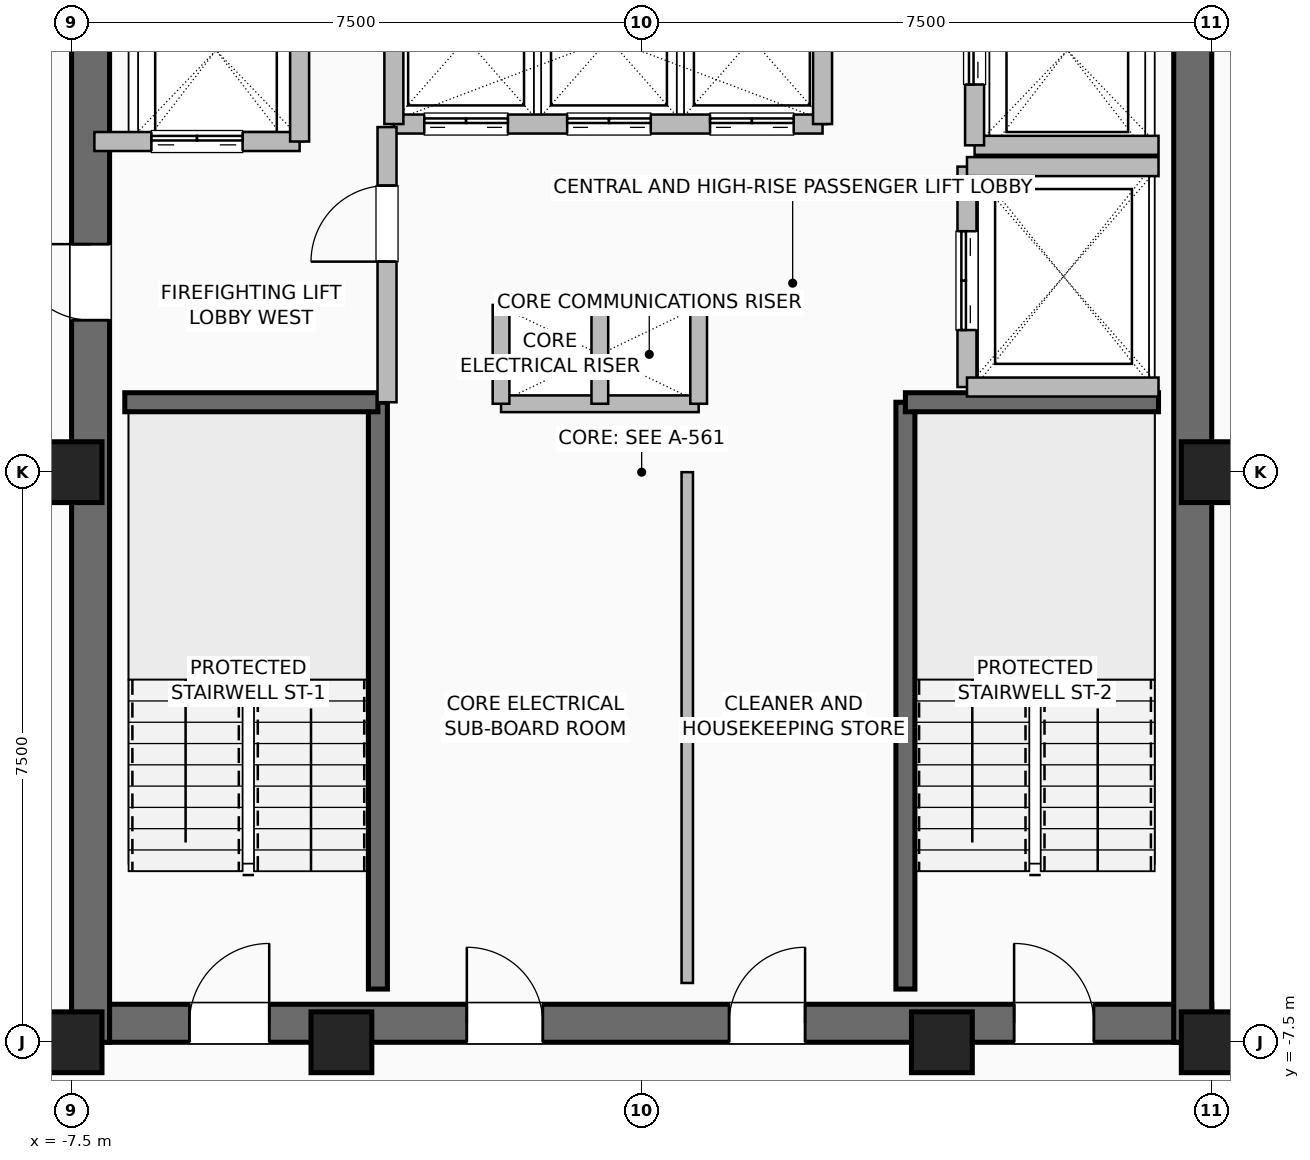
"""IFC4 building model, lengths in metres.
Left out: names, types, materials, properties, quantities, classifications, styles, units other than length and angle.
Written with IfcOpenShell. Run it as: python <this file> out.ifc"""

import sys

from ifc_helpers import new_model, si_unit, direction, frame, frame_2d, origin, origin_2d, place, context, subcontext, project, spatial, rectangle, hollow_rectangle, extrude, element, fill, save


model = new_model("IFC4")
c1 = context("Model", 3, precision=1e-05, world=origin(), true_north=direction((0.0, 1.0)))
c2 = subcontext(c1, "Body", "Model", "MODEL_VIEW")
j1 = project(units=[si_unit("LENGTHUNIT", "METRE"), si_unit("PLANEANGLEUNIT", "RADIAN")], contexts=[c1])
p1 = place(None, origin())
s1 = spatial("IfcSite", under=j1, at=p1, CompositionType="ELEMENT")
p2 = place(p1, origin())
s2 = spatial("IfcBuilding", under=s1, at=p2, CompositionType="ELEMENT")
p3 = place(p2, frame((0.0, 0.0, 243.2)))
s3 = spatial("IfcBuildingStorey", under=s2, at=p3, CompositionType="ELEMENT", Elevation=243.2)
for number, where, z_axis, x_axis in (
    (1, (-7.5, -7.5, 0.0), (0.0, 0.0, 1.0), (1.0, 0.0, 0.0)),
    (2, (-3.95, -7.5, 0.0), (0.0, 0.0, 1.0), (1.0, 0.0, 0.0)),
    (3, (3.95, -7.5, 0.0), (0.0, 0.0, 1.0), (1.0, 0.0, 0.0)),
    (4, (7.5, -7.5, 0.0), (0.0, 0.0, 1.0), (1.0, 0.0, 0.0)),
    (5, (7.5, 0.0, 0.0), (0.0, 0.0, 1.0), (1.0, 0.0, 0.0)),
    (6, (-7.5, 0.0, 0.0), (0.0, 0.0, 1.0), (1.0, 0.0, 0.0)),
):
    element("IfcColumn", number, at=place(p3, frame(where, z_axis=z_axis, x_axis=x_axis)), inside=s3, PredefinedType="COLUMN", context=c2, shape_type="SweptSolid", body=[
        extrude(hollow_rectangle(XDim=0.8, YDim=0.8, WallThickness=0.04, at=origin_2d()), origin(), (0.0, 0.0, 1.0), 3.6),
    ])
p4 = place(p3, frame((-7.5, -7.25, 0.0), z_axis=(0.0, 0.0, 1.0), x_axis=(1.0, 0.0, 0.0)))
e7 = element("IfcWall", 7, at=p4, inside=s3, PredefinedType="SHEAR", context=c2, shape_type="SweptSolid", body=[
    extrude(rectangle(XDim=15.0, YDim=0.5, at=frame_2d((7.5, 0.0))), origin(), (0.0, 0.0, 1.0), 3.36),
])
p5 = place(p4, frame((1.55, 0.0, 0.0)))
e8 = element("IfcOpeningElement", 8, at=p5, cuts=e7, PredefinedType="OPENING", context=c2, shape_type="SweptSolid", body=[
    extrude(rectangle(XDim=1.05, YDim=2.08, at=frame_2d((0.525, 1.04))), frame((0.0, 0.26, 0.0), z_axis=(0.0, -1.0, 0.0), x_axis=(1.0, 0.0, 0.0)), (0.0, 0.0, 1.0), 0.52),
])
p6 = place(p4, frame((12.4, 0.0, 0.0)))
e9 = element("IfcOpeningElement", 9, at=p6, cuts=e7, PredefinedType="OPENING", context=c2, shape_type="SweptSolid", body=[
    extrude(rectangle(XDim=1.05, YDim=2.08, at=frame_2d((0.525, 1.04))), frame((0.0, 0.26, 0.0), z_axis=(0.0, -1.0, 0.0), x_axis=(1.0, 0.0, 0.0)), (0.0, 0.0, 1.0), 0.52),
])
p7 = place(p4, frame((5.2, 0.0, 0.0)))
e10 = element("IfcOpeningElement", 10, at=p7, cuts=e7, PredefinedType="OPENING", context=c2, shape_type="SweptSolid", body=[
    extrude(rectangle(XDim=1.0, YDim=2.08, at=frame_2d((0.5, 1.04))), frame((0.0, 0.26, 0.0), z_axis=(0.0, -1.0, 0.0), x_axis=(1.0, 0.0, 0.0)), (0.0, 0.0, 1.0), 0.52),
])
p8 = place(p4, frame((8.65, 0.0, 0.0)))
e11 = element("IfcOpeningElement", 11, at=p8, cuts=e7, PredefinedType="OPENING", context=c2, shape_type="SweptSolid", body=[
    extrude(rectangle(XDim=1.0, YDim=2.08, at=frame_2d((0.5, 1.04))), frame((0.0, 0.26, 0.0), z_axis=(0.0, -1.0, 0.0), x_axis=(1.0, 0.0, 0.0)), (0.0, 0.0, 1.0), 0.52),
])
p9 = place(p3, frame((-7.25, -7.5, 0.0), z_axis=(0.0, 0.0, 1.0), x_axis=(0.0, 1.0, 0.0)))
e12 = element("IfcWall", 12, at=p9, inside=s3, PredefinedType="SHEAR", context=c2, shape_type="SweptSolid", body=[
    extrude(rectangle(XDim=15.0, YDim=0.5, at=frame_2d((7.5, 0.0))), origin(), (0.0, 0.0, 1.0), 3.36),
])
p10 = place(p9, frame((9.5, 0.0, 0.0)))
e13 = element("IfcOpeningElement", 13, at=p10, cuts=e12, PredefinedType="OPENING", context=c2, shape_type="SweptSolid", body=[
    extrude(rectangle(XDim=1.0, YDim=2.08, at=frame_2d((0.5, 1.04))), frame((0.0, 0.26, 0.0), z_axis=(0.0, -1.0, 0.0), x_axis=(1.0, 0.0, 0.0)), (0.0, 0.0, 1.0), 0.52),
])
p11 = place(p3, frame((7.25, -7.5, 0.0), z_axis=(0.0, 0.0, 1.0), x_axis=(0.0, 1.0, 0.0)))
e14 = element("IfcWall", 14, at=p11, inside=s3, PredefinedType="SHEAR", context=c2, shape_type="SweptSolid", body=[
    extrude(rectangle(XDim=15.0, YDim=0.5, at=frame_2d((7.5, 0.0))), origin(), (0.0, 0.0, 1.0), 3.36),
])
p12 = place(p3, frame((-3.47, -6.8, 0.0), z_axis=(0.0, 0.0, 1.0), x_axis=(0.0, 1.0, 0.0)))
e15 = element("IfcWall", 15, at=p12, inside=s3, PredefinedType="SHEAR", context=c2, shape_type="SweptSolid", body=[
    extrude(rectangle(XDim=7.72, YDim=0.25, at=frame_2d((3.86, 0.0))), origin(), (0.0, 0.0, 1.0), 3.36),
])
p13 = place(p3, frame((-6.8, 0.92, 0.0), z_axis=(0.0, 0.0, 1.0), x_axis=(1.0, 0.0, 0.0)))
e16 = element("IfcWall", 16, at=p13, inside=s3, PredefinedType="SHEAR", context=c2, shape_type="SweptSolid", body=[
    extrude(rectangle(XDim=3.33, YDim=0.25, at=frame_2d((1.665, 0.0))), origin(), (0.0, 0.0, 1.0), 3.36),
])
p14 = place(p3, frame((3.47, -6.8, 0.0), z_axis=(0.0, 0.0, 1.0), x_axis=(0.0, 1.0, 0.0)))
e17 = element("IfcWall", 17, at=p14, inside=s3, PredefinedType="SHEAR", context=c2, shape_type="SweptSolid", body=[
    extrude(rectangle(XDim=7.72, YDim=0.25, at=frame_2d((3.86, 0.0))), origin(), (0.0, 0.0, 1.0), 3.36),
])
p15 = place(p3, frame((3.47, 0.92, 0.0), z_axis=(0.0, 0.0, 1.0), x_axis=(1.0, 0.0, 0.0)))
e18 = element("IfcWall", 18, at=p15, inside=s3, PredefinedType="SHEAR", context=c2, shape_type="SweptSolid", body=[
    extrude(rectangle(XDim=3.33, YDim=0.25, at=frame_2d((1.665, 0.0))), origin(), (0.0, 0.0, 1.0), 3.36),
])
for number, where, z_axis, x_axis in (
    (19, (-1.85, 2.2, 0.0), (0.0, 0.0, 1.0), (1.0, 0.0, 0.0)),
    (20, (-1.85, 0.9, 0.0), (0.0, 0.0, 1.0), (1.0, 0.0, 0.0)),
):
    element("IfcWall", number, at=place(p3, frame(where, z_axis=z_axis, x_axis=x_axis)), inside=s3, PredefinedType="PARTITIONING", context=c2, shape_type="SweptSolid", body=[
        extrude(rectangle(XDim=2.6, YDim=0.22, at=frame_2d((1.3, 0.0))), origin(), (0.0, 0.0, 1.0), 3.36),
    ])
for number, where, z_axis, x_axis in (
    (21, (-0.55, 0.9, 0.0), (0.0, 0.0, 1.0), (0.0, 1.0, 0.0)),
    (22, (0.75, 0.9, 0.0), (0.0, 0.0, 1.0), (0.0, 1.0, 0.0)),
    (23, (-1.85, 0.9, 0.0), (0.0, 0.0, 1.0), (0.0, 1.0, 0.0)),
):
    element("IfcWall", number, at=place(p3, frame(where, z_axis=z_axis, x_axis=x_axis)), inside=s3, PredefinedType="PARTITIONING", context=c2, shape_type="SweptSolid", body=[
        extrude(rectangle(XDim=1.3, YDim=0.22, at=frame_2d((0.65, 0.0))), origin(), (0.0, 0.0, 1.0), 3.36),
    ])
p16 = place(p3, frame((-3.26, 4.58, 0.0), z_axis=(0.0, 0.0, 1.0), x_axis=(1.0, 0.0, 0.0)))
e24 = element("IfcWall", 24, at=p16, inside=s3, PredefinedType="SHEAR", context=c2, shape_type="SweptSolid", body=[
    extrude(rectangle(XDim=5.64, YDim=0.25, at=frame_2d((2.82, 0.0))), origin(), (0.0, 0.0, 1.0), 3.36),
])
p17 = place(p16, frame((0.4, 0.0, 0.0)))
e25 = element("IfcOpeningElement", 25, at=p17, cuts=e24, PredefinedType="OPENING", context=c2, shape_type="SweptSolid", body=[
    extrude(rectangle(XDim=1.1, YDim=2.2, at=frame_2d((0.55, 1.1))), frame((0.0, 0.135, 0.0), z_axis=(0.0, -1.0, 0.0), x_axis=(1.0, 0.0, 0.0)), (0.0, 0.0, 1.0), 0.27),
])
p18 = place(p16, frame((2.28, 0.0, 0.0)))
e26 = element("IfcOpeningElement", 26, at=p18, cuts=e24, PredefinedType="OPENING", context=c2, shape_type="SweptSolid", body=[
    extrude(rectangle(XDim=1.1, YDim=2.2, at=frame_2d((0.55, 1.1))), frame((0.0, 0.135, 0.0), z_axis=(0.0, -1.0, 0.0), x_axis=(1.0, 0.0, 0.0)), (0.0, 0.0, 1.0), 0.27),
])
p19 = place(p16, frame((4.16, 0.0, 0.0)))
e27 = element("IfcOpeningElement", 27, at=p19, cuts=e24, PredefinedType="OPENING", context=c2, shape_type="SweptSolid", body=[
    extrude(rectangle(XDim=1.1, YDim=2.2, at=frame_2d((0.55, 1.1))), frame((0.0, 0.135, 0.0), z_axis=(0.0, -1.0, 0.0), x_axis=(1.0, 0.0, 0.0)), (0.0, 0.0, 1.0), 0.27),
])
for number, where, z_axis, x_axis in (
    (28, (-3.26, 4.58, 0.0), (0.0, 0.0, 1.0), (0.0, 1.0, 0.0)),
    (29, (2.38, 4.58, 0.0), (0.0, 0.0, 1.0), (0.0, 1.0, 0.0)),
):
    element("IfcWall", number, at=place(p3, frame(where, z_axis=z_axis, x_axis=x_axis)), inside=s3, PredefinedType="SHEAR", context=c2, shape_type="SweptSolid", body=[
        extrude(rectangle(XDim=2.22, YDim=0.25, at=frame_2d((1.11, 0.0))), origin(), (0.0, 0.0, 1.0), 3.36),
    ])
p20 = place(p3, frame((-7.2, 4.35, 0.0), z_axis=(0.0, 0.0, 1.0), x_axis=(1.0, 0.0, 0.0)))
e30 = element("IfcWall", 30, at=p20, inside=s3, PredefinedType="SHEAR", context=c2, shape_type="SweptSolid", body=[
    extrude(rectangle(XDim=2.7, YDim=0.25, at=frame_2d((1.35, 0.0))), origin(), (0.0, 0.0, 1.0), 3.36),
])
p21 = place(p20, frame((0.75, 0.0, 0.0)))
e31 = element("IfcOpeningElement", 31, at=p21, cuts=e30, PredefinedType="OPENING", context=c2, shape_type="SweptSolid", body=[
    extrude(rectangle(XDim=1.2, YDim=2.2, at=frame_2d((0.6, 1.1))), frame((0.0, 0.135, 0.0), z_axis=(0.0, -1.0, 0.0), x_axis=(1.0, 0.0, 0.0)), (0.0, 0.0, 1.0), 0.27),
])
p22 = place(p3, frame((-4.5, 4.35, 0.0), z_axis=(0.0, 0.0, 1.0), x_axis=(0.0, 1.0, 0.0)))
e32 = element("IfcWall", 32, at=p22, inside=s3, PredefinedType="SHEAR", context=c2, shape_type="SweptSolid", body=[
    extrude(rectangle(XDim=2.85, YDim=0.25, at=frame_2d((1.425, 0.0))), origin(), (0.0, 0.0, 1.0), 3.36),
])
p23 = place(p3, frame((4.38, 4.3, 0.0), z_axis=(0.0, 0.0, 1.0), x_axis=(1.0, 0.0, 0.0)))
e33 = element("IfcWall", 33, at=p23, inside=s3, PredefinedType="SHEAR", context=c2, shape_type="SweptSolid", body=[
    extrude(rectangle(XDim=2.42, YDim=0.25, at=frame_2d((1.21, 0.0))), origin(), (0.0, 0.0, 1.0), 3.36),
])
p24 = place(p3, frame((4.38, 4.3, 0.0), z_axis=(0.0, 0.0, 1.0), x_axis=(0.0, 1.0, 0.0)))
e34 = element("IfcWall", 34, at=p24, inside=s3, PredefinedType="SHEAR", context=c2, shape_type="SweptSolid", body=[
    extrude(rectangle(XDim=2.5, YDim=0.25, at=frame_2d((1.25, 0.0))), origin(), (0.0, 0.0, 1.0), 3.36),
])
p25 = place(p24, frame((0.8, 0.0, 0.0)))
e35 = element("IfcOpeningElement", 35, at=p25, cuts=e34, PredefinedType="OPENING", context=c2, shape_type="SweptSolid", body=[
    extrude(rectangle(XDim=1.2, YDim=2.2, at=frame_2d((0.6, 1.1))), frame((0.0, 0.135, 0.0), z_axis=(0.0, -1.0, 0.0), x_axis=(1.0, 0.0, 0.0)), (0.0, 0.0, 1.0), 0.27),
])
p26 = place(p3, frame((4.28, 1.12, 0.0), z_axis=(0.0, 0.0, 1.0), x_axis=(0.0, 1.0, 0.0)))
e36 = element("IfcWall", 36, at=p26, inside=s3, PredefinedType="SHEAR", context=c2, shape_type="SweptSolid", body=[
    extrude(rectangle(XDim=2.9, YDim=0.25, at=frame_2d((1.45, 0.0))), origin(), (0.0, 0.0, 1.0), 3.36),
])
p27 = place(p26, frame((0.75, 0.0, 0.0)))
e37 = element("IfcOpeningElement", 37, at=p27, cuts=e36, PredefinedType="OPENING", context=c2, shape_type="SweptSolid", body=[
    extrude(rectangle(XDim=1.3, YDim=2.3, at=frame_2d((0.65, 1.15))), frame((0.0, 0.135, 0.0), z_axis=(0.0, -1.0, 0.0), x_axis=(1.0, 0.0, 0.0)), (0.0, 0.0, 1.0), 0.27),
])
for number, where, z_axis, x_axis in (
    (38, (4.28, 1.12, 0.0), (0.0, 0.0, 1.0), (1.0, 0.0, 0.0)),
    (39, (4.28, 4.02, 0.0), (0.0, 0.0, 1.0), (1.0, 0.0, 0.0)),
):
    element("IfcWall", number, at=place(p3, frame(where, z_axis=z_axis, x_axis=x_axis)), inside=s3, PredefinedType="SHEAR", context=c2, shape_type="SweptSolid", body=[
        extrude(rectangle(XDim=2.52, YDim=0.25, at=frame_2d((1.26, 0.0))), origin(), (0.0, 0.0, 1.0), 3.36),
    ])
p28 = place(p3, frame((-3.35, 0.92, 0.0), z_axis=(0.0, 0.0, 1.0), x_axis=(0.0, 1.0, 0.0)))
e40 = element("IfcWall", 40, at=p28, inside=s3, PredefinedType="SHEAR", context=c2, shape_type="SweptSolid", body=[
    extrude(rectangle(XDim=3.62, YDim=0.25, at=frame_2d((1.81, 0.0))), origin(), (0.0, 0.0, 1.0), 3.36),
])
p29 = place(p28, frame((1.85, 0.0, 0.0)))
e41 = element("IfcOpeningElement", 41, at=p29, cuts=e40, PredefinedType="OPENING", context=c2, shape_type="SweptSolid", body=[
    extrude(rectangle(XDim=1.0, YDim=2.08, at=frame_2d((0.5, 1.04))), frame((0.0, 0.135, 0.0), z_axis=(0.0, -1.0, 0.0), x_axis=(1.0, 0.0, 0.0)), (0.0, 0.0, 1.0), 0.27),
])
p30 = place(p3, frame((0.6, -6.72, 0.0), z_axis=(0.0, 0.0, 1.0), x_axis=(0.0, 1.0, 0.0)))
e42 = element("IfcWall", 42, at=p30, inside=s3, PredefinedType="PARTITIONING", context=c2, shape_type="SweptSolid", body=[
    extrude(rectangle(XDim=6.72, YDim=0.15, at=frame_2d((3.36, 0.0))), origin(), (0.0, 0.0, 1.0), 3.36),
])
p31 = place(p3, frame((7.45, -7.48, 0.0), z_axis=(0.0, 0.0, 1.0), x_axis=(1.0, 0.0, 0.0)))
e43 = element("IfcWall", 43, at=p31, inside=s3, PredefinedType="PARTITIONING", context=c2, shape_type="SweptSolid", body=[
    extrude(rectangle(XDim=0.95, YDim=0.15, at=frame_2d((0.475, 0.0))), origin(), (0.0, 0.0, 1.0), 3.36),
])
p32 = place(p5, origin())
e44 = element("IfcDoor", 44, at=p32, inside=s3, OperationType="SINGLE_SWING_RIGHT", PredefinedType="DOOR", context=c2, shape_type="SweptSolid", body=[
    extrude(rectangle(XDim=1.05, YDim=2.08, at=frame_2d((0.525, 1.04))), frame((0.0, 0.025, 0.0), z_axis=(0.0, -1.0, 0.0), x_axis=(1.0, 0.0, 0.0)), (0.0, 0.0, 1.0), 0.05),
])
fill(e8, e44)
p33 = place(p6, origin())
e45 = element("IfcDoor", 45, at=p33, inside=s3, OperationType="SINGLE_SWING_LEFT", PredefinedType="DOOR", context=c2, shape_type="SweptSolid", body=[
    extrude(rectangle(XDim=1.05, YDim=2.08, at=frame_2d((0.525, 1.04))), frame((0.0, 0.025, 0.0), z_axis=(0.0, -1.0, 0.0), x_axis=(1.0, 0.0, 0.0)), (0.0, 0.0, 1.0), 0.05),
])
fill(e9, e45)
p34 = place(p10, origin())
e46 = element("IfcDoor", 46, at=p34, inside=s3, OperationType="SINGLE_SWING_RIGHT", PredefinedType="DOOR", context=c2, shape_type="SweptSolid", body=[
    extrude(rectangle(XDim=1.0, YDim=2.08, at=frame_2d((0.5, 1.04))), frame((0.0, 0.025, 0.0), z_axis=(0.0, -1.0, 0.0), x_axis=(1.0, 0.0, 0.0)), (0.0, 0.0, 1.0), 0.05),
])
fill(e13, e46)
p35 = place(p7, origin())
e47 = element("IfcDoor", 47, at=p35, inside=s3, OperationType="SINGLE_SWING_LEFT", PredefinedType="DOOR", context=c2, shape_type="SweptSolid", body=[
    extrude(rectangle(XDim=1.0, YDim=2.08, at=frame_2d((0.5, 1.04))), frame((0.0, 0.025, 0.0), z_axis=(0.0, -1.0, 0.0), x_axis=(1.0, 0.0, 0.0)), (0.0, 0.0, 1.0), 0.05),
])
fill(e10, e47)
p36 = place(p8, origin())
e48 = element("IfcDoor", 48, at=p36, inside=s3, OperationType="SINGLE_SWING_RIGHT", PredefinedType="DOOR", context=c2, shape_type="SweptSolid", body=[
    extrude(rectangle(XDim=1.0, YDim=2.08, at=frame_2d((0.5, 1.04))), frame((0.0, 0.025, 0.0), z_axis=(0.0, -1.0, 0.0), x_axis=(1.0, 0.0, 0.0)), (0.0, 0.0, 1.0), 0.05),
])
fill(e11, e48)
p37 = place(p17, origin())
e49 = element("IfcDoor", 49, at=p37, inside=s3, OperationType="DOUBLE_DOOR_SLIDING", PredefinedType="DOOR", context=c2, shape_type="SweptSolid", body=[
    extrude(rectangle(XDim=1.1, YDim=2.2, at=frame_2d((0.55, 1.1))), frame((0.0, 0.025, 0.0), z_axis=(0.0, -1.0, 0.0), x_axis=(1.0, 0.0, 0.0)), (0.0, 0.0, 1.0), 0.05),
])
fill(e25, e49)
p38 = place(p18, origin())
e50 = element("IfcDoor", 50, at=p38, inside=s3, OperationType="DOUBLE_DOOR_SLIDING", PredefinedType="DOOR", context=c2, shape_type="SweptSolid", body=[
    extrude(rectangle(XDim=1.1, YDim=2.2, at=frame_2d((0.55, 1.1))), frame((0.0, 0.025, 0.0), z_axis=(0.0, -1.0, 0.0), x_axis=(1.0, 0.0, 0.0)), (0.0, 0.0, 1.0), 0.05),
])
fill(e26, e50)
p39 = place(p19, origin())
e51 = element("IfcDoor", 51, at=p39, inside=s3, OperationType="DOUBLE_DOOR_SLIDING", PredefinedType="DOOR", context=c2, shape_type="SweptSolid", body=[
    extrude(rectangle(XDim=1.1, YDim=2.2, at=frame_2d((0.55, 1.1))), frame((0.0, 0.025, 0.0), z_axis=(0.0, -1.0, 0.0), x_axis=(1.0, 0.0, 0.0)), (0.0, 0.0, 1.0), 0.05),
])
fill(e27, e51)
p40 = place(p21, origin())
e52 = element("IfcDoor", 52, at=p40, inside=s3, OperationType="DOUBLE_DOOR_SLIDING", PredefinedType="DOOR", context=c2, shape_type="SweptSolid", body=[
    extrude(rectangle(XDim=1.2, YDim=2.2, at=frame_2d((0.6, 1.1))), frame((0.0, 0.025, 0.0), z_axis=(0.0, -1.0, 0.0), x_axis=(1.0, 0.0, 0.0)), (0.0, 0.0, 1.0), 0.05),
])
fill(e31, e52)
p41 = place(p25, origin())
e53 = element("IfcDoor", 53, at=p41, inside=s3, OperationType="DOUBLE_DOOR_SLIDING", PredefinedType="DOOR", context=c2, shape_type="SweptSolid", body=[
    extrude(rectangle(XDim=1.2, YDim=2.2, at=frame_2d((0.6, 1.1))), frame((0.0, 0.025, 0.0), z_axis=(0.0, -1.0, 0.0), x_axis=(1.0, 0.0, 0.0)), (0.0, 0.0, 1.0), 0.05),
])
fill(e35, e53)
p42 = place(p27, origin())
e54 = element("IfcDoor", 54, at=p42, inside=s3, OperationType="DOUBLE_DOOR_SLIDING", PredefinedType="DOOR", context=c2, shape_type="SweptSolid", body=[
    extrude(rectangle(XDim=1.3, YDim=2.3, at=frame_2d((0.65, 1.15))), frame((0.0, 0.025, 0.0), z_axis=(0.0, -1.0, 0.0), x_axis=(1.0, 0.0, 0.0)), (0.0, 0.0, 1.0), 0.05),
])
fill(e37, e54)
p43 = place(p29, origin())
e55 = element("IfcDoor", 55, at=p43, inside=s3, OperationType="SINGLE_SWING_LEFT", PredefinedType="DOOR", context=c2, shape_type="SweptSolid", body=[
    extrude(rectangle(XDim=1.0, YDim=2.08, at=frame_2d((0.5, 1.04))), frame((0.0, 0.025, 0.0), z_axis=(0.0, -1.0, 0.0), x_axis=(1.0, 0.0, 0.0)), (0.0, 0.0, 1.0), 0.05),
])
fill(e41, e55)
save(model, sys.argv[1])
